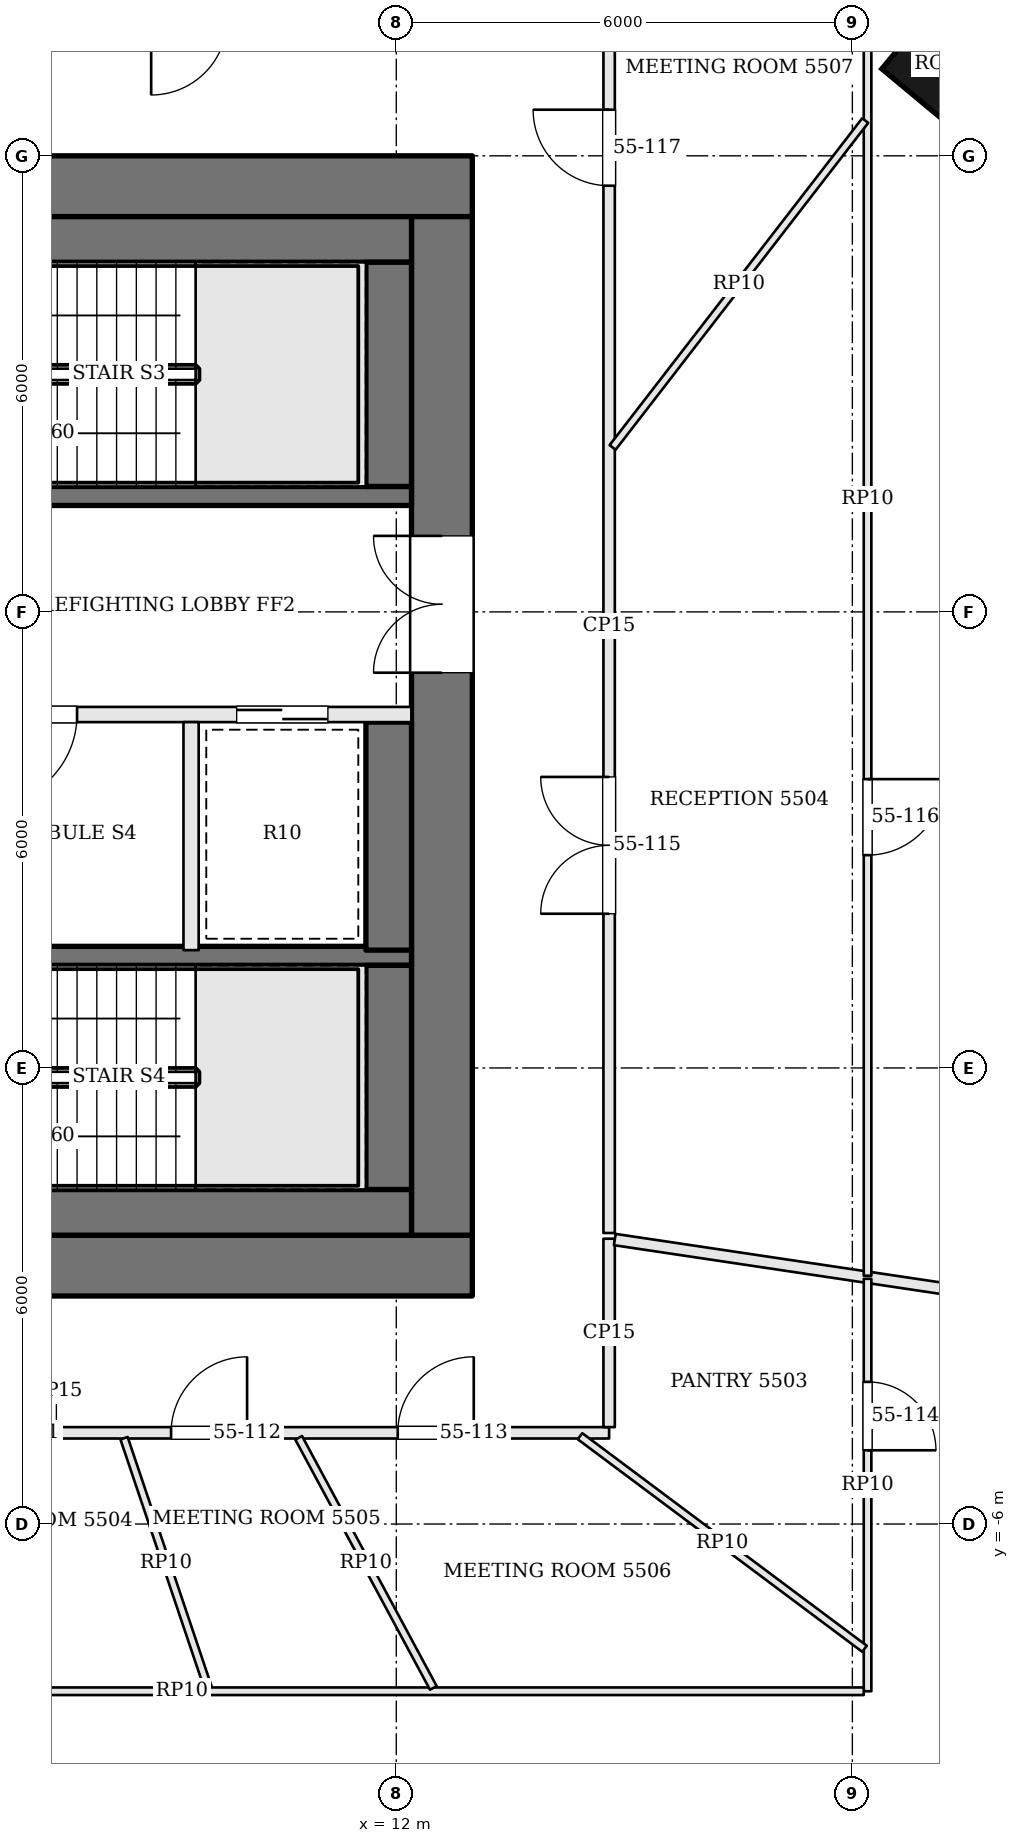
"""IFC4 building model, lengths in metres.
Left out: names, types, materials, properties, quantities, classifications, styles, units other than length and angle.
Written with IfcOpenShell. Run it as: python <this file> out.ifc"""

import sys

from ifc_helpers import new_model, si_unit, direction, frame, frame_2d, origin, origin_2d, place, context, subcontext, project, spatial, rectangle, extrude, element, fill, save


model = new_model("IFC4")
c1 = context("Model", 3, precision=1e-05, world=origin(), true_north=direction((0.0, 1.0)))
c2 = subcontext(c1, "Body", "Model", "MODEL_VIEW")
j1 = project(units=[si_unit("LENGTHUNIT", "METRE"), si_unit("PLANEANGLEUNIT", "RADIAN")], contexts=[c1])
p1 = place(None, origin())
s1 = spatial("IfcSite", under=j1, at=p1, CompositionType="ELEMENT")
p2 = place(p1, origin())
s2 = spatial("IfcBuilding", under=s1, at=p2, CompositionType="ELEMENT")
p3 = place(p2, frame((0.0, 0.0, 225.3)))
s3 = spatial("IfcBuildingStorey", under=s2, at=p3, CompositionType="ELEMENT", Elevation=225.3)
p4 = place(p3, frame((-13.0, 11.6, 0.0), z_axis=(0.0, 0.0, 1.0), x_axis=(1.0, 0.0, 0.0)))
e1 = element("IfcWall", 1, at=p4, inside=s3, PredefinedType="SHEAR", context=c2, shape_type="SweptSolid", body=[
    extrude(rectangle(XDim=26.0, YDim=0.8, at=frame_2d((13.0, 0.0))), origin(), (0.0, 0.0, 1.0), 3.9),
])
p5 = place(p4, frame((9.375, 0.0, 0.0)))
e2 = element("IfcOpeningElement", 2, at=p5, cuts=e1, PredefinedType="OPENING", context=c2, shape_type="SweptSolid", body=[
    extrude(rectangle(XDim=0.7, YDim=2.1, at=frame_2d((0.35, 1.05))), frame((0.0, 0.41, 0.0), z_axis=(0.0, -1.0, 0.0), x_axis=(1.0, 0.0, 0.0)), (0.0, 0.0, 1.0), 0.82),
])
p6 = place(p4, frame((12.075, 0.0, 0.0)))
e3 = element("IfcOpeningElement", 3, at=p6, cuts=e1, PredefinedType="OPENING", context=c2, shape_type="SweptSolid", body=[
    extrude(rectangle(XDim=1.0, YDim=2.1, at=frame_2d((0.5, 1.05))), frame((0.0, 0.41, 0.0), z_axis=(0.0, -1.0, 0.0), x_axis=(1.0, 0.0, 0.0)), (0.0, 0.0, 1.0), 0.82),
])
p7 = place(p4, frame((14.675, 0.0, 0.0)))
e4 = element("IfcOpeningElement", 4, at=p7, cuts=e1, PredefinedType="OPENING", context=c2, shape_type="SweptSolid", body=[
    extrude(rectangle(XDim=0.7, YDim=2.1, at=frame_2d((0.35, 1.05))), frame((0.0, 0.41, 0.0), z_axis=(0.0, -1.0, 0.0), x_axis=(1.0, 0.0, 0.0)), (0.0, 0.0, 1.0), 0.82),
])
p8 = place(p4, frame((16.625, 0.0, 0.0)))
e5 = element("IfcOpeningElement", 5, at=p8, cuts=e1, PredefinedType="OPENING", context=c2, shape_type="SweptSolid", body=[
    extrude(rectangle(XDim=0.9, YDim=2.1, at=frame_2d((0.45, 1.05))), frame((0.0, 0.41, 0.0), z_axis=(0.0, -1.0, 0.0), x_axis=(1.0, 0.0, 0.0)), (0.0, 0.0, 1.0), 0.82),
])
p9 = place(p3, frame((-13.0, -2.6, 0.0), z_axis=(0.0, 0.0, 1.0), x_axis=(1.0, 0.0, 0.0)))
e6 = element("IfcWall", 6, at=p9, inside=s3, PredefinedType="SHEAR", context=c2, shape_type="SweptSolid", body=[
    extrude(rectangle(XDim=26.0, YDim=0.8, at=frame_2d((13.0, 0.0))), origin(), (0.0, 0.0, 1.0), 3.9),
])
p10 = place(p9, frame((9.2, 0.0, 0.0)))
e7 = element("IfcOpeningElement", 7, at=p10, cuts=e6, PredefinedType="OPENING", context=c2, shape_type="SweptSolid", body=[
    extrude(rectangle(XDim=0.9, YDim=2.1, at=frame_2d((0.45, 1.05))), frame((0.0, 0.41, 0.0), z_axis=(0.0, -1.0, 0.0), x_axis=(1.0, 0.0, 0.0)), (0.0, 0.0, 1.0), 0.82),
])
p11 = place(p9, frame((12.3, 0.0, 0.0)))
e8 = element("IfcOpeningElement", 8, at=p11, cuts=e6, PredefinedType="OPENING", context=c2, shape_type="SweptSolid", body=[
    extrude(rectangle(XDim=0.9, YDim=2.1, at=frame_2d((0.45, 1.05))), frame((0.0, 0.41, 0.0), z_axis=(0.0, -1.0, 0.0), x_axis=(1.0, 0.0, 0.0)), (0.0, 0.0, 1.0), 0.82),
])
p12 = place(p9, frame((14.7, 0.0, 0.0)))
e9 = element("IfcOpeningElement", 9, at=p12, cuts=e6, PredefinedType="OPENING", context=c2, shape_type="SweptSolid", body=[
    extrude(rectangle(XDim=1.0, YDim=2.1, at=frame_2d((0.5, 1.05))), frame((0.0, 0.41, 0.0), z_axis=(0.0, -1.0, 0.0), x_axis=(1.0, 0.0, 0.0)), (0.0, 0.0, 1.0), 0.82),
])
p13 = place(p9, frame((16.55, 0.0, 0.0)))
e10 = element("IfcOpeningElement", 10, at=p13, cuts=e6, PredefinedType="OPENING", context=c2, shape_type="SweptSolid", body=[
    extrude(rectangle(XDim=0.9, YDim=2.1, at=frame_2d((0.45, 1.05))), frame((0.0, 0.41, 0.0), z_axis=(0.0, -1.0, 0.0), x_axis=(1.0, 0.0, 0.0)), (0.0, 0.0, 1.0), 0.82),
])
p14 = place(p3, frame((12.6, -2.2, 0.0), z_axis=(0.0, 0.0, 1.0), x_axis=(0.0, 1.0, 0.0)))
e11 = element("IfcWall", 11, at=p14, inside=s3, PredefinedType="SHEAR", context=c2, shape_type="SweptSolid", body=[
    extrude(rectangle(XDim=13.4, YDim=0.8, at=frame_2d((6.7, 0.0))), origin(), (0.0, 0.0, 1.0), 3.9),
])
p15 = place(p14, frame((7.4, 0.0, 0.0)))
e12 = element("IfcOpeningElement", 12, at=p15, cuts=e11, PredefinedType="OPENING", context=c2, shape_type="SweptSolid", body=[
    extrude(rectangle(XDim=1.8, YDim=2.1, at=frame_2d((0.9, 1.05))), frame((0.0, 0.41, 0.0), z_axis=(0.0, -1.0, 0.0), x_axis=(1.0, 0.0, 0.0)), (0.0, 0.0, 1.0), 0.82),
])
p16 = place(p3, frame((19.092, 13.209, 0.0), z_axis=(0.0, 0.0, 1.0), x_axis=(-0.76886986222, 0.63940529789, 0.0)))
e13 = element("IfcColumn", 13, at=p16, inside=s3, PredefinedType="COLUMN", context=c2, shape_type="SweptSolid", body=[
    extrude(rectangle(XDim=1.0, YDim=1.0, at=origin_2d()), origin(), (0.0, 0.0, 1.0), 3.9),
])
p17 = place(p3, frame((12.2, 7.525, 0.0), z_axis=(0.0, 0.0, 1.0), x_axis=(-1.0, 0.0, 0.0)))
e14 = element("IfcWall", 14, at=p17, inside=s3, PredefinedType="SOLIDWALL", context=c2, shape_type="SweptSolid", body=[
    extrude(rectangle(XDim=7.1, YDim=0.25, at=frame_2d((3.55, 0.0))), origin(), (0.0, 0.0, 1.0), 3.7),
])
p18 = place(p17, frame((5.8, 0.0, 0.0)))
e15 = element("IfcOpeningElement", 15, at=p18, cuts=e14, PredefinedType="OPENING", context=c2, shape_type="SweptSolid", body=[
    extrude(rectangle(XDim=1.2, YDim=2.1, at=frame_2d((0.6, 1.05))), frame((0.0, 0.135, 0.0), z_axis=(0.0, -1.0, 0.0), x_axis=(1.0, 0.0, 0.0)), (0.0, 0.0, 1.0), 0.27),
])
p19 = place(p3, frame((12.2, 4.65, 0.0), z_axis=(0.0, 0.0, 1.0), x_axis=(-1.0, 0.0, 0.0)))
e16 = element("IfcWall", 16, at=p19, inside=s3, PredefinedType="SOLIDWALL", context=c2, shape_type="SweptSolid", body=[
    extrude(rectangle(XDim=7.1, YDim=0.2, at=frame_2d((3.55, 0.0))), origin(), (0.0, 0.0, 1.0), 3.7),
])
p20 = place(p19, frame((4.4, 0.0, 0.0)))
e17 = element("IfcOpeningElement", 17, at=p20, cuts=e16, PredefinedType="OPENING", context=c2, shape_type="SweptSolid", body=[
    extrude(rectangle(XDim=1.2, YDim=2.1, at=frame_2d((0.6, 1.05))), frame((0.0, 0.11, 0.0), z_axis=(0.0, -1.0, 0.0), x_axis=(1.0, 0.0, 0.0)), (0.0, 0.0, 1.0), 0.22),
])
p21 = place(p19, frame((1.1, 0.0, 0.0)))
e18 = element("IfcOpeningElement", 18, at=p21, cuts=e16, PredefinedType="OPENING", context=c2, shape_type="SweptSolid", body=[
    extrude(rectangle(XDim=1.2, YDim=2.1, at=frame_2d((0.6, 1.05))), frame((0.0, 0.11, 0.0), z_axis=(0.0, -1.0, 0.0), x_axis=(1.0, 0.0, 0.0)), (0.0, 0.0, 1.0), 0.22),
])
p22 = place(p3, frame((12.2, 1.475, 0.0), z_axis=(0.0, 0.0, 1.0), x_axis=(-1.0, 0.0, 0.0)))
e19 = element("IfcWall", 19, at=p22, inside=s3, PredefinedType="SOLIDWALL", context=c2, shape_type="SweptSolid", body=[
    extrude(rectangle(XDim=7.1, YDim=0.25, at=frame_2d((3.55, 0.0))), origin(), (0.0, 0.0, 1.0), 3.7),
])
p23 = place(p22, frame((5.8, 0.0, 0.0)))
e20 = element("IfcOpeningElement", 20, at=p23, cuts=e19, PredefinedType="OPENING", context=c2, shape_type="SweptSolid", body=[
    extrude(rectangle(XDim=1.2, YDim=2.1, at=frame_2d((0.6, 1.05))), frame((0.0, 0.135, 0.0), z_axis=(0.0, -1.0, 0.0), x_axis=(1.0, 0.0, 0.0)), (0.0, 0.0, 1.0), 0.27),
])
p24 = place(p3, frame((9.3, 4.55, 0.0), z_axis=(0.0, 0.0, 1.0), x_axis=(0.0, -1.0, 0.0)))
e21 = element("IfcWall", 21, at=p24, inside=s3, PredefinedType="SOLIDWALL", context=c2, shape_type="SweptSolid", body=[
    extrude(rectangle(XDim=3.0, YDim=0.2, at=frame_2d((1.5, 0.0))), origin(), (0.0, 0.0, 1.0), 3.7),
])
p25 = place(p3, frame((12.2, 10.9, 0.0), z_axis=(0.0, 0.0, 1.0), x_axis=(-1.0, 0.0, 0.0)))
e22 = element("IfcWall", 22, at=p25, inside=s3, PredefinedType="SOLIDWALL", context=c2, shape_type="SweptSolid", body=[
    extrude(rectangle(XDim=7.1, YDim=0.6, at=frame_2d((3.55, 0.0))), origin(), (0.0, 0.0, 1.0), 3.7),
])
p26 = place(p3, frame((11.9, 10.6, 0.0), z_axis=(0.0, 0.0, 1.0), x_axis=(0.0, -1.0, 0.0)))
e23 = element("IfcWall", 23, at=p26, inside=s3, PredefinedType="SOLIDWALL", context=c2, shape_type="SweptSolid", body=[
    extrude(rectangle(XDim=2.95, YDim=0.6, at=frame_2d((1.475, 0.0))), origin(), (0.0, 0.0, 1.0), 3.7),
])
p27 = place(p3, frame((11.9, 4.55, 0.0), z_axis=(0.0, 0.0, 1.0), x_axis=(0.0, -1.0, 0.0)))
e24 = element("IfcWall", 24, at=p27, inside=s3, PredefinedType="SOLIDWALL", context=c2, shape_type="SweptSolid", body=[
    extrude(rectangle(XDim=3.0, YDim=0.6, at=frame_2d((1.5, 0.0))), origin(), (0.0, 0.0, 1.0), 3.7),
])
p28 = place(p3, frame((11.9, 1.35, 0.0), z_axis=(0.0, 0.0, 1.0), x_axis=(0.0, -1.0, 0.0)))
e25 = element("IfcWall", 25, at=p28, inside=s3, PredefinedType="SOLIDWALL", context=c2, shape_type="SweptSolid", body=[
    extrude(rectangle(XDim=2.95, YDim=0.6, at=frame_2d((1.475, 0.0))), origin(), (0.0, 0.0, 1.0), 3.7),
])
p29 = place(p3, frame((12.2, -1.9, 0.0), z_axis=(0.0, 0.0, 1.0), x_axis=(-1.0, 0.0, 0.0)))
e26 = element("IfcWall", 26, at=p29, inside=s3, PredefinedType="SOLIDWALL", context=c2, shape_type="SweptSolid", body=[
    extrude(rectangle(XDim=7.1, YDim=0.6, at=frame_2d((3.55, 0.0))), origin(), (0.0, 0.0, 1.0), 3.7),
])
p30 = place(p3, frame((0.256, -4.8, 0.0), z_axis=(0.0, 0.0, 1.0), x_axis=(1.0, 0.0, 0.0)))
e27 = element("IfcWall", 27, at=p30, inside=s3, PredefinedType="PARTITIONING", context=c2, shape_type="SweptSolid", body=[
    extrude(rectangle(XDim=14.544, YDim=0.15, at=frame_2d((7.272, 0.0))), origin(), (0.0, 0.0, 1.0), 3.084),
])
p31 = place(p30, frame((1.366, 0.0, 0.0)))
e28 = element("IfcOpeningElement", 28, at=p31, cuts=e27, PredefinedType="OPENING", context=c2, shape_type="SweptSolid", body=[
    extrude(rectangle(XDim=1.8, YDim=2.1, at=frame_2d((0.9, 1.05))), frame((0.0, 0.085, 0.0), z_axis=(0.0, -1.0, 0.0), x_axis=(1.0, 0.0, 0.0)), (0.0, 0.0, 1.0), 0.17),
])
p32 = place(p30, frame((5.873, 0.0, 0.0)))
e29 = element("IfcOpeningElement", 29, at=p32, cuts=e27, PredefinedType="OPENING", context=c2, shape_type="SweptSolid", body=[
    extrude(rectangle(XDim=1.0, YDim=2.4, at=frame_2d((0.5, 1.2))), frame((0.0, 0.085, 0.0), z_axis=(0.0, -1.0, 0.0), x_axis=(1.0, 0.0, 0.0)), (0.0, 0.0, 1.0), 0.17),
])
p33 = place(p30, frame((8.781, 0.0, 0.0)))
e30 = element("IfcOpeningElement", 30, at=p33, cuts=e27, PredefinedType="OPENING", context=c2, shape_type="SweptSolid", body=[
    extrude(rectangle(XDim=1.0, YDim=2.4, at=frame_2d((0.5, 1.2))), frame((0.0, 0.085, 0.0), z_axis=(0.0, -1.0, 0.0), x_axis=(1.0, 0.0, 0.0)), (0.0, 0.0, 1.0), 0.17),
])
p34 = place(p30, frame((11.763, 0.0, 0.0)))
e31 = element("IfcOpeningElement", 31, at=p34, cuts=e27, PredefinedType="OPENING", context=c2, shape_type="SweptSolid", body=[
    extrude(rectangle(XDim=1.0, YDim=2.4, at=frame_2d((0.5, 1.2))), frame((0.0, 0.085, 0.0), z_axis=(0.0, -1.0, 0.0), x_axis=(1.0, 0.0, 0.0)), (0.0, 0.0, 1.0), 0.17),
])
p35 = place(p3, frame((14.8, -4.725, 0.0), z_axis=(0.0, 0.0, 1.0), x_axis=(0.0, 1.0, 0.0)))
e32 = element("IfcWall", 32, at=p35, inside=s3, PredefinedType="PARTITIONING", context=c2, shape_type="SweptSolid", body=[
    extrude(rectangle(XDim=2.479, YDim=0.15, at=frame_2d((1.24, 0.0))), origin(), (0.0, 0.0, 1.0), 3.084),
])
p36 = place(p3, frame((25.264, -3.808, 0.0), z_axis=(0.0, 0.0, 1.0), x_axis=(-0.989044164521, 0.147619919476, 0.0)))
e33 = element("IfcWall", 33, at=p36, inside=s3, PredefinedType="PARTITIONING", context=c2, shape_type="SweptSolid", body=[
    extrude(rectangle(XDim=10.505, YDim=0.15, at=frame_2d((5.252, 0.0))), origin(), (0.0, 0.0, 1.0), 3.184),
])
p37 = place(p3, frame((14.8, -2.171, 0.0), z_axis=(0.0, 0.0, 1.0), x_axis=(0.0, 1.0, 0.0)))
e34 = element("IfcWall", 34, at=p37, inside=s3, PredefinedType="PARTITIONING", context=c2, shape_type="SweptSolid", body=[
    extrude(rectangle(XDim=15.971, YDim=0.15, at=frame_2d((7.986, 0.0))), origin(), (0.0, 0.0, 1.0), 3.084),
])
p38 = place(p37, frame((4.2, 0.0, 0.0)))
e35 = element("IfcOpeningElement", 35, at=p38, cuts=e34, PredefinedType="OPENING", context=c2, shape_type="SweptSolid", body=[
    extrude(rectangle(XDim=1.8, YDim=2.1, at=frame_2d((0.9, 1.05))), frame((0.0, 0.085, 0.0), z_axis=(0.0, -1.0, 0.0), x_axis=(1.0, 0.0, 0.0)), (0.0, 0.0, 1.0), 0.17),
])
p39 = place(p37, frame((13.778, 0.0, 0.0)))
e36 = element("IfcOpeningElement", 36, at=p39, cuts=e34, PredefinedType="OPENING", context=c2, shape_type="SweptSolid", body=[
    extrude(rectangle(XDim=1.0, YDim=2.4, at=frame_2d((0.5, 1.2))), frame((0.0, 0.085, 0.0), z_axis=(0.0, -1.0, 0.0), x_axis=(1.0, 0.0, 0.0)), (0.0, 0.0, 1.0), 0.17),
])
p40 = place(p3, frame((18.2, -2.774, 0.0), z_axis=(0.0, 0.0, 1.0), x_axis=(0.0, -1.0, 0.0)))
e37 = element("IfcWall", 37, at=p40, inside=s3, PredefinedType="PARTITIONING", context=c2, shape_type="SweptSolid", body=[
    extrude(rectangle(XDim=5.426, YDim=0.1, at=frame_2d((2.713, 0.0))), origin(), (0.0, 0.0, 1.0), 3.084),
])
p41 = place(p40, frame((1.356, 0.0, 0.0)))
e38 = element("IfcOpeningElement", 38, at=p41, cuts=e37, PredefinedType="OPENING", context=c2, shape_type="SweptSolid", body=[
    extrude(rectangle(XDim=0.9, YDim=2.1, at=frame_2d((0.45, 1.05))), frame((0.0, 0.06, 0.0), z_axis=(0.0, -1.0, 0.0), x_axis=(1.0, 0.0, 0.0)), (0.0, 0.0, 1.0), 0.12),
])
p42 = place(p3, frame((18.15, -8.2, 0.0), z_axis=(0.0, 0.0, 1.0), x_axis=(-1.0, 0.0, 0.0)))
e39 = element("IfcWall", 39, at=p42, inside=s3, PredefinedType="PARTITIONING", context=c2, shape_type="SweptSolid", body=[
    extrude(rectangle(XDim=17.941, YDim=0.1, at=frame_2d((8.97, 0.0))), origin(), (0.0, 0.0, 1.0), 3.084),
])
p43 = place(p42, frame((14.601, 0.0, 0.0)))
e40 = element("IfcOpeningElement", 40, at=p43, cuts=e39, PredefinedType="OPENING", context=c2, shape_type="SweptSolid", body=[
    extrude(rectangle(XDim=1.0, YDim=2.1, at=frame_2d((0.5, 1.05))), frame((0.0, 0.06, 0.0), z_axis=(0.0, -1.0, 0.0), x_axis=(1.0, 0.0, 0.0)), (0.0, 0.0, 1.0), 0.12),
])
p44 = place(p3, frame((8.418, -4.871, 0.0), z_axis=(0.0, 0.0, 1.0), x_axis=(0.319060884331, -0.947734220175, 0.0)))
e41 = element("IfcWall", 41, at=p44, inside=s3, PredefinedType="PARTITIONING", context=c2, shape_type="SweptSolid", body=[
    extrude(rectangle(XDim=3.462, YDim=0.1, at=frame_2d((1.731, 0.0))), origin(), (0.0, 0.0, 1.0), 3.084),
])
p45 = place(p3, frame((10.716, -4.866, 0.0), z_axis=(0.0, 0.0, 1.0), x_axis=(0.474084238022, -0.880479491674, 0.0)))
e42 = element("IfcWall", 42, at=p45, inside=s3, PredefinedType="PARTITIONING", context=c2, shape_type="SweptSolid", body=[
    extrude(rectangle(XDim=3.737, YDim=0.1, at=frame_2d((1.868, 0.0))), origin(), (0.0, 0.0, 1.0), 3.084),
])
p46 = place(p3, frame((14.417, -4.845, 0.0), z_axis=(0.0, 0.0, 1.0), x_axis=(0.801114846058, -0.598510654396, 0.0)))
e43 = element("IfcWall", 43, at=p46, inside=s3, PredefinedType="PARTITIONING", context=c2, shape_type="SweptSolid", body=[
    extrude(rectangle(XDim=4.672, YDim=0.1, at=frame_2d((2.336, 0.0))), origin(), (0.0, 0.0, 1.0), 3.084),
])
p47 = place(p3, frame((18.2, 17.702, 0.0), z_axis=(0.0, 0.0, 1.0), x_axis=(0.0, -1.0, 0.0)))
e44 = element("IfcWall", 44, at=p47, inside=s3, PredefinedType="PARTITIONING", context=c2, shape_type="SweptSolid", body=[
    extrude(rectangle(XDim=20.435, YDim=0.1, at=frame_2d((10.218, 0.0))), origin(), (0.0, 0.0, 1.0), 3.084),
])
p48 = place(p47, frame((13.902, 0.0, 0.0)))
e45 = element("IfcOpeningElement", 45, at=p48, cuts=e44, PredefinedType="OPENING", context=c2, shape_type="SweptSolid", body=[
    extrude(rectangle(XDim=1.0, YDim=2.1, at=frame_2d((0.5, 1.05))), frame((0.0, 0.06, 0.0), z_axis=(0.0, -1.0, 0.0), x_axis=(1.0, 0.0, 0.0)), (0.0, 0.0, 1.0), 0.12),
])
p49 = place(p3, frame((14.846, 8.164, 0.0), z_axis=(0.0, 0.0, 1.0), x_axis=(0.611508866017, 0.791237579228, 0.0)))
e46 = element("IfcWall", 46, at=p49, inside=s3, PredefinedType="PARTITIONING", context=c2, shape_type="SweptSolid", body=[
    extrude(rectangle(XDim=5.435, YDim=0.1, at=frame_2d((2.717, 0.0))), origin(), (0.0, 0.0, 1.0), 3.084),
])
p50 = place(p15, origin())
e47 = element("IfcDoor", 47, at=p50, inside=s3, OperationType="DOUBLE_DOOR_SINGLE_SWING", PredefinedType="DOOR", context=c2, shape_type="SweptSolid", body=[
    extrude(rectangle(XDim=1.8, YDim=2.1, at=frame_2d((0.9, 1.05))), frame((0.0, 0.025, 0.0), z_axis=(0.0, -1.0, 0.0), x_axis=(1.0, 0.0, 0.0)), (0.0, 0.0, 1.0), 0.05),
])
fill(e12, e47)
p51 = place(p20, origin())
e48 = element("IfcDoor", 48, at=p51, inside=s3, OperationType="SINGLE_SWING_RIGHT", PredefinedType="DOOR", context=c2, shape_type="SweptSolid", body=[
    extrude(rectangle(XDim=1.2, YDim=2.1, at=frame_2d((0.6, 1.05))), frame((0.0, 0.025, 0.0), z_axis=(0.0, -1.0, 0.0), x_axis=(1.0, 0.0, 0.0)), (0.0, 0.0, 1.0), 0.05),
])
fill(e17, e48)
p52 = place(p21, origin())
e49 = element("IfcDoor", 49, at=p52, inside=s3, OperationType="SLIDING_TO_RIGHT", PredefinedType="DOOR", context=c2, shape_type="SweptSolid", body=[
    extrude(rectangle(XDim=1.2, YDim=2.1, at=frame_2d((0.6, 1.05))), frame((0.0, 0.025, 0.0), z_axis=(0.0, -1.0, 0.0), x_axis=(1.0, 0.0, 0.0)), (0.0, 0.0, 1.0), 0.05),
])
fill(e18, e49)
p53 = place(p33, origin())
e50 = element("IfcDoor", 50, at=p53, inside=s3, OperationType="SINGLE_SWING_RIGHT", PredefinedType="DOOR", context=c2, shape_type="SweptSolid", body=[
    extrude(rectangle(XDim=1.0, YDim=2.4, at=frame_2d((0.5, 1.2))), frame((0.0, 0.025, 0.0), z_axis=(0.0, -1.0, 0.0), x_axis=(1.0, 0.0, 0.0)), (0.0, 0.0, 1.0), 0.05),
])
fill(e30, e50)
p54 = place(p34, origin())
e51 = element("IfcDoor", 51, at=p54, inside=s3, OperationType="SINGLE_SWING_RIGHT", PredefinedType="DOOR", context=c2, shape_type="SweptSolid", body=[
    extrude(rectangle(XDim=1.0, YDim=2.4, at=frame_2d((0.5, 1.2))), frame((0.0, 0.025, 0.0), z_axis=(0.0, -1.0, 0.0), x_axis=(1.0, 0.0, 0.0)), (0.0, 0.0, 1.0), 0.05),
])
fill(e31, e51)
p55 = place(p41, origin())
e52 = element("IfcDoor", 52, at=p55, inside=s3, OperationType="SINGLE_SWING_RIGHT", PredefinedType="DOOR", context=c2, shape_type="SweptSolid", body=[
    extrude(rectangle(XDim=0.9, YDim=2.1, at=frame_2d((0.45, 1.05))), frame((0.0, 0.025, 0.0), z_axis=(0.0, -1.0, 0.0), x_axis=(1.0, 0.0, 0.0)), (0.0, 0.0, 1.0), 0.05),
])
fill(e38, e52)
p56 = place(p38, origin())
e53 = element("IfcDoor", 53, at=p56, inside=s3, OperationType="DOUBLE_DOOR_SINGLE_SWING", PredefinedType="DOOR", context=c2, shape_type="SweptSolid", body=[
    extrude(rectangle(XDim=1.8, YDim=2.1, at=frame_2d((0.9, 1.05))), frame((0.0, 0.025, 0.0), z_axis=(0.0, -1.0, 0.0), x_axis=(1.0, 0.0, 0.0)), (0.0, 0.0, 1.0), 0.05),
])
fill(e35, e53)
p57 = place(p48, origin())
e54 = element("IfcDoor", 54, at=p57, inside=s3, OperationType="SINGLE_SWING_LEFT", PredefinedType="DOOR", context=c2, shape_type="SweptSolid", body=[
    extrude(rectangle(XDim=1.0, YDim=2.1, at=frame_2d((0.5, 1.05))), frame((0.0, 0.025, 0.0), z_axis=(0.0, -1.0, 0.0), x_axis=(1.0, 0.0, 0.0)), (0.0, 0.0, 1.0), 0.05),
])
fill(e45, e54)
p58 = place(p39, origin())
e55 = element("IfcDoor", 55, at=p58, inside=s3, OperationType="SINGLE_SWING_RIGHT", PredefinedType="DOOR", context=c2, shape_type="SweptSolid", body=[
    extrude(rectangle(XDim=1.0, YDim=2.4, at=frame_2d((0.5, 1.2))), frame((0.0, 0.025, 0.0), z_axis=(0.0, -1.0, 0.0), x_axis=(1.0, 0.0, 0.0)), (0.0, 0.0, 1.0), 0.05),
])
fill(e36, e55)
save(model, sys.argv[1])
